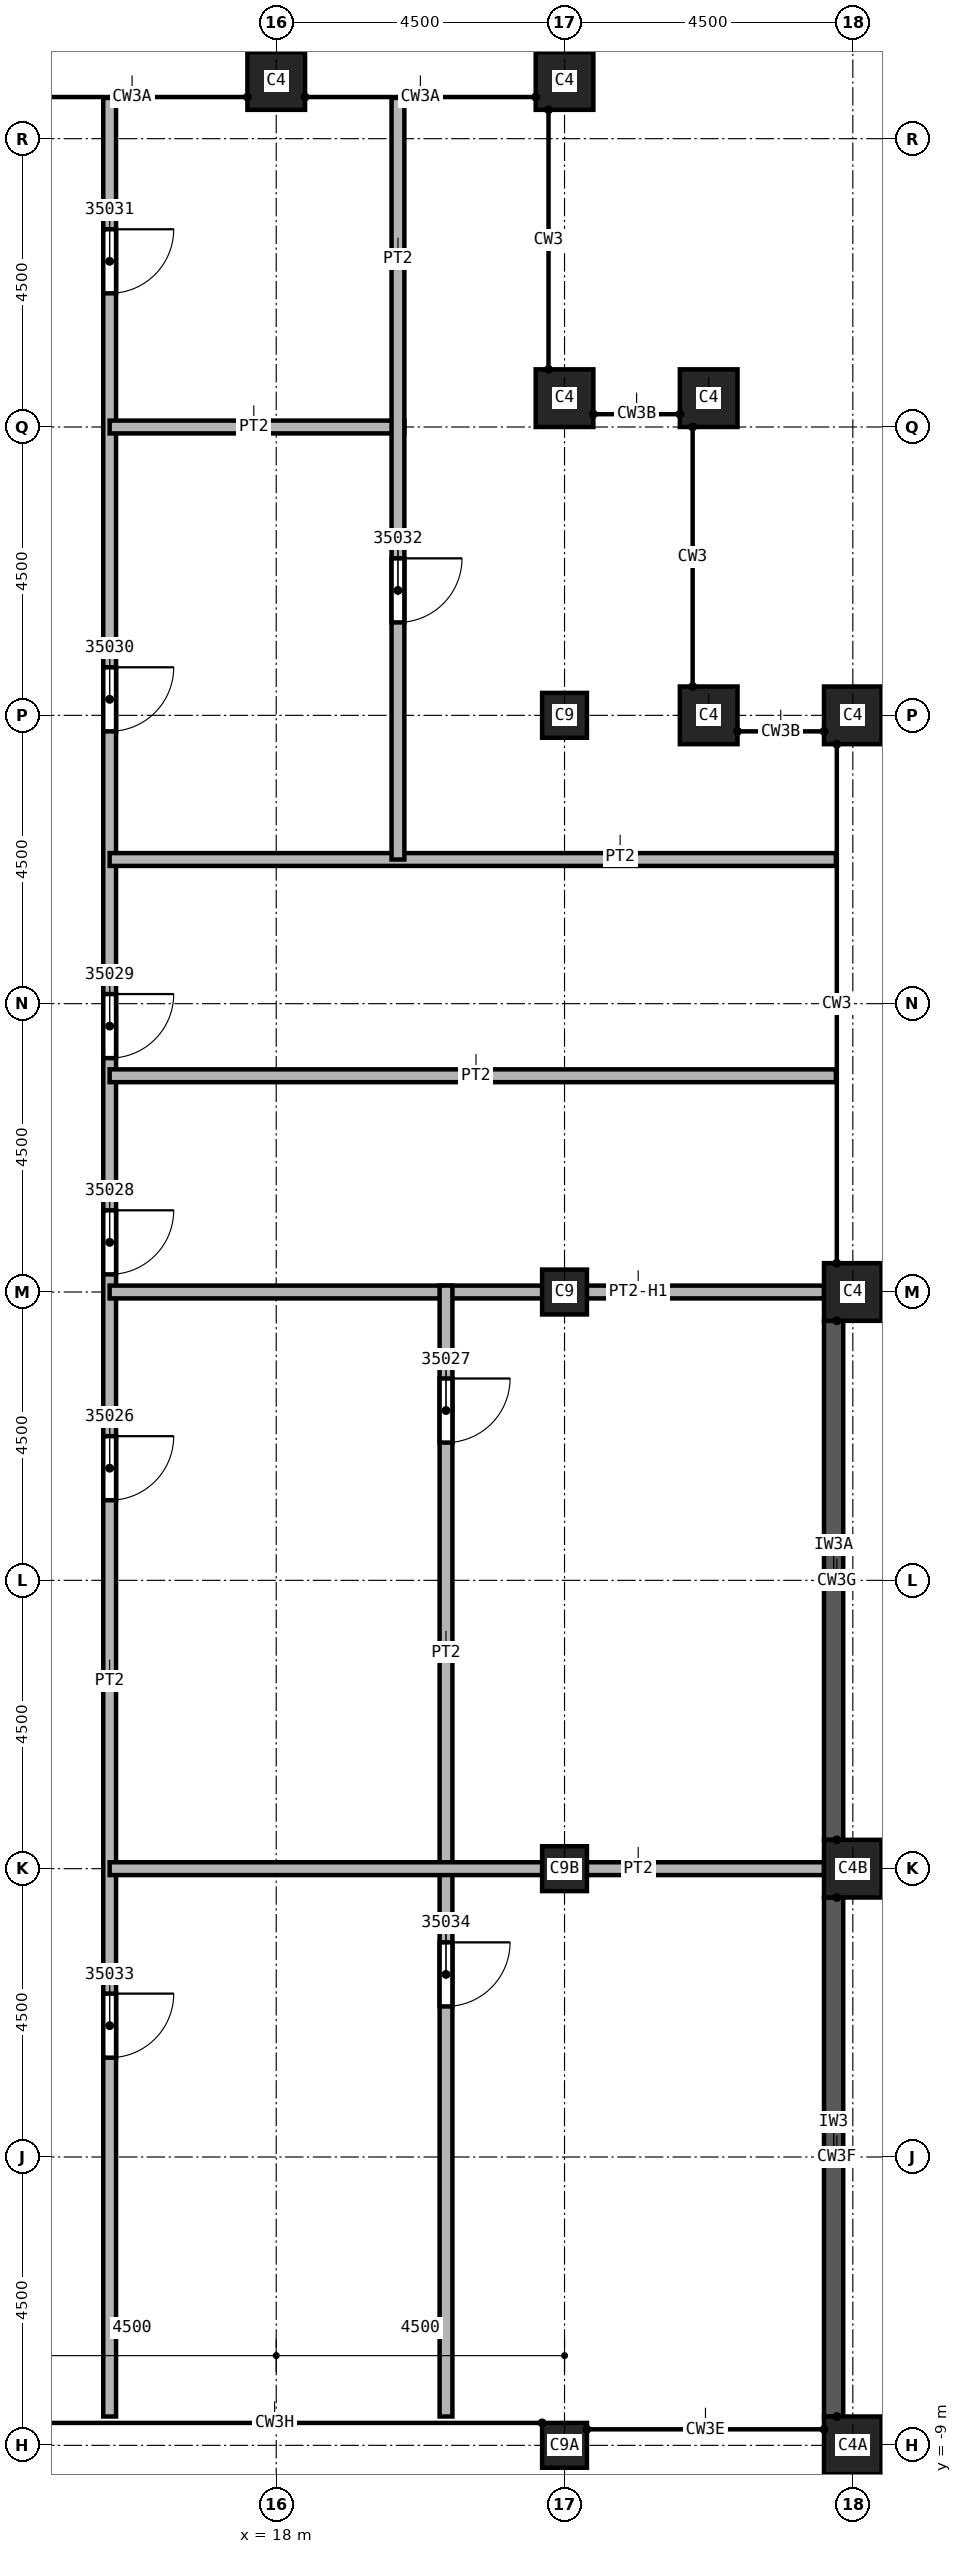
"""IFC4 building model, lengths in metres.
Left out: names, types, materials, properties, quantities, classifications, styles, units other than length and angle.
Written with IfcOpenShell. Run it as: python <this file> out.ifc"""

import sys

from ifc_helpers import new_model, si_unit, direction, frame, frame_2d, origin, origin_2d, place, context, subcontext, project, spatial, polyline, rectangle, outline, extrude, element, fill, save


model = new_model("IFC4")
c1 = context("Model", 3, precision=1e-05, world=origin(), true_north=direction((0.0, 1.0)))
c2 = subcontext(c1, "Body", "Model", "MODEL_VIEW")
j1 = project(units=[si_unit("LENGTHUNIT", "METRE"), si_unit("PLANEANGLEUNIT", "RADIAN")], contexts=[c1])
p1 = place(None, origin())
s1 = spatial("IfcSite", under=j1, at=p1, CompositionType="ELEMENT")
p2 = place(p1, origin())
s2 = spatial("IfcBuilding", under=s1, at=p2, CompositionType="ELEMENT")
p3 = place(p2, frame((0.0, 0.0, 376.0)))
s3 = spatial("IfcBuildingStorey", under=s2, at=p3, CompositionType="ELEMENT", Elevation=376.0)
p4 = place(p3, frame((22.5, 0.0, 0.0), z_axis=(0.0, 0.0, 1.0), x_axis=(1.0, 0.0, 0.0)))
e1 = element("IfcColumn", 1, at=p4, inside=s3, PredefinedType="COLUMN", context=c2, shape_type="SweptSolid", body=[
    extrude(rectangle(XDim=0.7, YDim=0.7, at=origin_2d()), origin(), (0.0, 0.0, 1.0), 7.919),
])
for number, where, z_axis, x_axis in (
    (2, (22.5, 9.0, 0.0), (0.0, 0.0, 1.0), (1.0, 0.0, 0.0)),
    (3, (22.5, 18.0, 0.0), (0.0, 0.0, 1.0), (1.0, 0.0, 0.0)),
):
    element("IfcColumn", number, at=place(p3, frame(where, z_axis=z_axis, x_axis=x_axis)), inside=s3, PredefinedType="COLUMN", context=c2, shape_type="SweptSolid", body=[
        extrude(rectangle(XDim=0.7, YDim=0.7, at=origin_2d()), origin(), (0.0, 0.0, 1.0), 4.6),
    ])
p5 = place(p3, frame((22.5, -9.0, 0.0), z_axis=(0.0, 0.0, 1.0), x_axis=(1.0, 0.0, 0.0)))
e4 = element("IfcColumn", 4, at=p5, inside=s3, PredefinedType="COLUMN", context=c2, shape_type="SweptSolid", body=[
    extrude(rectangle(XDim=0.7, YDim=0.7, at=origin_2d()), origin(), (0.0, 0.0, 1.0), 3.725),
])
p6 = place(p3, frame((27.0, 0.0, 0.0), z_axis=(0.0, 0.0, 1.0), x_axis=(0.0, 1.0, 0.0)))
e5 = element("IfcColumn", 5, at=p6, inside=s3, PredefinedType="COLUMN", context=c2, shape_type="SweptSolid", body=[
    extrude(rectangle(XDim=0.9, YDim=0.9, at=origin_2d()), origin(), (0.0, 0.0, 1.0), 7.919),
])
for number, where, z_axis, x_axis in (
    (6, (27.0, 9.0, 0.0), (0.0, 0.0, 1.0), (0.0, 1.0, 0.0)),
    (7, (27.0, 18.0, 0.0), (0.0, 0.0, 1.0), (0.0, 1.0, 0.0)),
):
    element("IfcColumn", number, at=place(p3, frame(where, z_axis=z_axis, x_axis=x_axis)), inside=s3, PredefinedType="COLUMN", context=c2, shape_type="SweptSolid", body=[
        extrude(rectangle(XDim=0.9, YDim=0.9, at=origin_2d()), origin(), (0.0, 0.0, 1.0), 4.6),
    ])
p7 = place(p3, frame((27.0, -9.0, 0.0), z_axis=(0.0, 0.0, 1.0), x_axis=(0.0, 1.0, 0.0)))
e8 = element("IfcColumn", 8, at=p7, inside=s3, PredefinedType="COLUMN", context=c2, shape_type="SweptSolid", body=[
    extrude(rectangle(XDim=0.9, YDim=0.9, at=origin_2d()), origin(), (0.0, 0.0, 1.0), 3.725),
])
for number, where, z_axis, x_axis in (
    (9, (18.0, 27.9, 0.0), (0.0, 0.0, 1.0), (1.0, 0.0, 0.0)),
    (10, (22.5, 27.9, 0.0), (0.0, 0.0, 1.0), (1.0, 0.0, 0.0)),
    (11, (22.5, 22.95, 0.0), (0.0, 0.0, 1.0), (1.0, 0.0, 0.0)),
    (12, (24.75, 22.95, 0.0), (0.0, 0.0, 1.0), (1.0, 0.0, 0.0)),
    (13, (24.75, 18.0, 0.0), (0.0, 0.0, 1.0), (1.0, 0.0, 0.0)),
):
    element("IfcColumn", number, at=place(p3, frame(where, z_axis=z_axis, x_axis=x_axis)), inside=s3, PredefinedType="COLUMN", context=c2, shape_type="SweptSolid", body=[
        extrude(rectangle(XDim=0.9, YDim=0.9, at=origin_2d()), origin(), (0.0, 0.0, 1.0), 4.6),
    ])
p8 = place(p3, frame((26.7, -8.55, 4.439), z_axis=(0.0, 0.0, 1.0), x_axis=(0.0, 1.0, 0.0)))
e14 = element("IfcWall", 14, at=p8, inside=s3, PredefinedType="SOLIDWALL", context=c2, shape_type="SweptSolid", body=[
    extrude(outline(polyline([(0.0, 0.0), (8.1, 0.0), (8.1, 3.728), (0.0, 0.05), (0.0, 0.0)])), frame((0.0, 0.15, 0.0), z_axis=(0.0, -1.0, 0.0), x_axis=(1.0, 0.0, 0.0)), (0.0, 0.0, 1.0), 0.3),
])
p9 = place(p3, frame((26.7, 0.45, 8.633), z_axis=(0.0, 0.0, 1.0), x_axis=(0.0, 1.0, 0.0)))
e15 = element("IfcWall", 15, at=p9, inside=s3, PredefinedType="SOLIDWALL", context=c2, shape_type="SweptSolid", body=[
    extrude(outline(polyline([(0.0, 0.0), (8.1, 0.0), (8.1, 3.728), (0.0, 0.05), (0.0, 0.0)])), frame((0.0, 0.15, 0.0), z_axis=(0.0, -1.0, 0.0), x_axis=(1.0, 0.0, 0.0)), (0.0, 0.0, 1.0), 0.3),
])
p10 = place(p3, frame((15.4, 27.636, 0.0), z_axis=(0.0, 0.0, 1.0), x_axis=(0.0, -1.0, 0.0)))
e16 = element("IfcWall", 16, at=p10, inside=s3, PredefinedType="PARTITIONING", context=c2, shape_type="SweptSolid", body=[
    extrude(rectangle(XDim=36.186, YDim=0.2, at=frame_2d((18.093, 0.0))), origin(), (0.0, 0.0, 1.0), 4.15),
])
p11 = place(p10, frame((20.886, 0.0, 0.0)))
e17 = element("IfcOpeningElement", 17, at=p11, cuts=e16, PredefinedType="OPENING", context=c2, shape_type="SweptSolid", body=[
    extrude(rectangle(XDim=1.0, YDim=2.1, at=frame_2d((0.5, 1.05))), frame((0.0, 0.1, 0.0), z_axis=(0.0, -1.0, 0.0), x_axis=(1.0, 0.0, 0.0)), (0.0, 0.0, 1.0), 0.2),
])
p12 = place(p10, frame((17.361, 0.0, 0.0)))
e18 = element("IfcOpeningElement", 18, at=p12, cuts=e16, PredefinedType="OPENING", context=c2, shape_type="SweptSolid", body=[
    extrude(rectangle(XDim=1.0, YDim=2.1, at=frame_2d((0.5, 1.05))), frame((0.0, 0.1, 0.0), z_axis=(0.0, -1.0, 0.0), x_axis=(1.0, 0.0, 0.0)), (0.0, 0.0, 1.0), 0.2),
])
p13 = place(p10, frame((13.986, 0.0, 0.0)))
e19 = element("IfcOpeningElement", 19, at=p13, cuts=e16, PredefinedType="OPENING", context=c2, shape_type="SweptSolid", body=[
    extrude(rectangle(XDim=1.0, YDim=2.1, at=frame_2d((0.5, 1.05))), frame((0.0, 0.1, 0.0), z_axis=(0.0, -1.0, 0.0), x_axis=(1.0, 0.0, 0.0)), (0.0, 0.0, 1.0), 0.2),
])
p14 = place(p10, frame((8.886, 0.0, 0.0)))
e20 = element("IfcOpeningElement", 20, at=p14, cuts=e16, PredefinedType="OPENING", context=c2, shape_type="SweptSolid", body=[
    extrude(rectangle(XDim=1.0, YDim=2.1, at=frame_2d((0.5, 1.05))), frame((0.0, 0.1, 0.0), z_axis=(0.0, -1.0, 0.0), x_axis=(1.0, 0.0, 0.0)), (0.0, 0.0, 1.0), 0.2),
])
p15 = place(p10, frame((2.05, 0.0, 0.0)))
e21 = element("IfcOpeningElement", 21, at=p15, cuts=e16, PredefinedType="OPENING", context=c2, shape_type="SweptSolid", body=[
    extrude(rectangle(XDim=1.0, YDim=2.1, at=frame_2d((0.5, 1.05))), frame((0.0, 0.1, 0.0), z_axis=(0.0, -1.0, 0.0), x_axis=(1.0, 0.0, 0.0)), (0.0, 0.0, 1.0), 0.2),
])
p16 = place(p10, frame((29.586, 0.0, 0.0)))
e22 = element("IfcOpeningElement", 22, at=p16, cuts=e16, PredefinedType="OPENING", context=c2, shape_type="SweptSolid", body=[
    extrude(rectangle(XDim=1.0, YDim=2.1, at=frame_2d((0.5, 1.05))), frame((0.0, 0.1, 0.0), z_axis=(0.0, -1.0, 0.0), x_axis=(1.0, 0.0, 0.0)), (0.0, 0.0, 1.0), 0.2),
])
p17 = place(p3, frame((15.4, 9.0, 0.0), z_axis=(0.0, 0.0, 1.0), x_axis=(1.0, 0.0, 0.0)))
e23 = element("IfcWall", 23, at=p17, inside=s3, PredefinedType="PARTITIONING", context=c2, shape_type="SweptSolid", body=[
    extrude(rectangle(XDim=11.15, YDim=0.2, at=frame_2d((5.575, 0.0))), origin(), (0.0, 0.0, 1.0), 3.754),
])
for number, where, z_axis, x_axis in (
    (24, (15.4, 12.375, 0.0), (0.0, 0.0, 1.0), (1.0, 0.0, 0.0)),
    (25, (15.4, 15.75, 0.0), (0.0, 0.0, 1.0), (1.0, 0.0, 0.0)),
):
    element("IfcWall", number, at=place(p3, frame(where, z_axis=z_axis, x_axis=x_axis)), inside=s3, PredefinedType="PARTITIONING", context=c2, shape_type="SweptSolid", body=[
        extrude(rectangle(XDim=11.336, YDim=0.2, at=frame_2d((5.668, 0.0))), origin(), (0.0, 0.0, 1.0), 4.15),
    ])
p18 = place(p3, frame((15.4, 22.5, 0.0), z_axis=(0.0, 0.0, 1.0), x_axis=(1.0, 0.0, 0.0)))
e26 = element("IfcWall", 26, at=p18, inside=s3, PredefinedType="PARTITIONING", context=c2, shape_type="SweptSolid", body=[
    extrude(rectangle(XDim=4.6, YDim=0.2, at=frame_2d((2.3, 0.0))), origin(), (0.0, 0.0, 1.0), 4.15),
])
p19 = place(p3, frame((19.9, 27.636, 0.0), z_axis=(0.0, 0.0, 1.0), x_axis=(0.0, -1.0, 0.0)))
e27 = element("IfcWall", 27, at=p19, inside=s3, PredefinedType="PARTITIONING", context=c2, shape_type="SweptSolid", body=[
    extrude(rectangle(XDim=11.886, YDim=0.2, at=frame_2d((5.943, 0.0))), origin(), (0.0, 0.0, 1.0), 4.15),
])
p20 = place(p19, frame((7.186, 0.0, 0.0)))
e28 = element("IfcOpeningElement", 28, at=p20, cuts=e27, PredefinedType="OPENING", context=c2, shape_type="SweptSolid", body=[
    extrude(rectangle(XDim=1.0, YDim=2.1, at=frame_2d((0.5, 1.05))), frame((0.0, 0.1, 0.0), z_axis=(0.0, -1.0, 0.0), x_axis=(1.0, 0.0, 0.0)), (0.0, 0.0, 1.0), 0.2),
])
p21 = place(p3, frame((20.65, 9.1, 0.0), z_axis=(0.0, 0.0, 1.0), x_axis=(0.0, -1.0, 0.0)))
e29 = element("IfcWall", 29, at=p21, inside=s3, PredefinedType="PARTITIONING", context=c2, shape_type="SweptSolid", body=[
    extrude(rectangle(XDim=17.65, YDim=0.2, at=frame_2d((8.825, 0.0))), origin(), (0.0, 0.0, 1.0), 4.15),
])
p22 = place(p21, frame((1.45, 0.0, 0.0)))
e30 = element("IfcOpeningElement", 30, at=p22, cuts=e29, PredefinedType="OPENING", context=c2, shape_type="SweptSolid", body=[
    extrude(rectangle(XDim=1.0, YDim=2.1, at=frame_2d((0.5, 1.05))), frame((0.0, 0.1, 0.0), z_axis=(0.0, -1.0, 0.0), x_axis=(1.0, 0.0, 0.0)), (0.0, 0.0, 1.0), 0.2),
])
p23 = place(p21, frame((10.25, 0.0, 0.0)))
e31 = element("IfcOpeningElement", 31, at=p23, cuts=e29, PredefinedType="OPENING", context=c2, shape_type="SweptSolid", body=[
    extrude(rectangle(XDim=1.0, YDim=2.1, at=frame_2d((0.5, 1.05))), frame((0.0, 0.1, 0.0), z_axis=(0.0, -1.0, 0.0), x_axis=(1.0, 0.0, 0.0)), (0.0, 0.0, 1.0), 0.2),
])
p24 = place(p3, frame((26.55, 0.0, 0.0), z_axis=(0.0, 0.0, 1.0), x_axis=(-1.0, 0.0, 0.0)))
e32 = element("IfcWall", 32, at=p24, inside=s3, PredefinedType="PARTITIONING", context=c2, shape_type="SweptSolid", body=[
    extrude(rectangle(XDim=11.15, YDim=0.2, at=frame_2d((5.575, 0.0))), origin(), (0.0, 0.0, 1.0), 4.15),
])
p25 = place(p11, origin())
e33 = element("IfcDoor", 33, at=p25, inside=s3, OperationType="SINGLE_SWING_LEFT", PredefinedType="DOOR", context=c2, shape_type="SweptSolid", body=[
    extrude(rectangle(XDim=1.0, YDim=2.1, at=frame_2d((0.5, 1.05))), frame((0.0, 0.025, 0.0), z_axis=(0.0, -1.0, 0.0), x_axis=(1.0, 0.0, 0.0)), (0.0, 0.0, 1.0), 0.05),
])
fill(e17, e33)
p26 = place(p22, origin())
e34 = element("IfcDoor", 34, at=p26, inside=s3, OperationType="SINGLE_SWING_RIGHT", PredefinedType="DOOR", context=c2, shape_type="SweptSolid", body=[
    extrude(rectangle(XDim=1.0, YDim=2.1, at=frame_2d((0.5, 1.05))), frame((0.0, 0.025, 0.0), z_axis=(0.0, -1.0, 0.0), x_axis=(1.0, 0.0, 0.0)), (0.0, 0.0, 1.0), 0.05),
])
fill(e30, e34)
p27 = place(p12, origin())
e35 = element("IfcDoor", 35, at=p27, inside=s3, OperationType="SINGLE_SWING_LEFT", PredefinedType="DOOR", context=c2, shape_type="SweptSolid", body=[
    extrude(rectangle(XDim=1.0, YDim=2.1, at=frame_2d((0.5, 1.05))), frame((0.0, 0.025, 0.0), z_axis=(0.0, -1.0, 0.0), x_axis=(1.0, 0.0, 0.0)), (0.0, 0.0, 1.0), 0.05),
])
fill(e18, e35)
p28 = place(p13, origin())
e36 = element("IfcDoor", 36, at=p28, inside=s3, OperationType="SINGLE_SWING_RIGHT", PredefinedType="DOOR", context=c2, shape_type="SweptSolid", body=[
    extrude(rectangle(XDim=1.0, YDim=2.1, at=frame_2d((0.5, 1.05))), frame((0.0, 0.025, 0.0), z_axis=(0.0, -1.0, 0.0), x_axis=(1.0, 0.0, 0.0)), (0.0, 0.0, 1.0), 0.05),
])
fill(e19, e36)
p29 = place(p14, origin())
e37 = element("IfcDoor", 37, at=p29, inside=s3, OperationType="SINGLE_SWING_LEFT", PredefinedType="DOOR", context=c2, shape_type="SweptSolid", body=[
    extrude(rectangle(XDim=1.0, YDim=2.1, at=frame_2d((0.5, 1.05))), frame((0.0, 0.025, 0.0), z_axis=(0.0, -1.0, 0.0), x_axis=(1.0, 0.0, 0.0)), (0.0, 0.0, 1.0), 0.05),
])
fill(e20, e37)
p30 = place(p15, origin())
e38 = element("IfcDoor", 38, at=p30, inside=s3, OperationType="SINGLE_SWING_RIGHT", PredefinedType="DOOR", context=c2, shape_type="SweptSolid", body=[
    extrude(rectangle(XDim=1.0, YDim=2.1, at=frame_2d((0.5, 1.05))), frame((0.0, 0.025, 0.0), z_axis=(0.0, -1.0, 0.0), x_axis=(1.0, 0.0, 0.0)), (0.0, 0.0, 1.0), 0.05),
])
fill(e21, e38)
p31 = place(p20, origin())
e39 = element("IfcDoor", 39, at=p31, inside=s3, OperationType="SINGLE_SWING_LEFT", PredefinedType="DOOR", context=c2, shape_type="SweptSolid", body=[
    extrude(rectangle(XDim=1.0, YDim=2.1, at=frame_2d((0.5, 1.05))), frame((0.0, 0.025, 0.0), z_axis=(0.0, -1.0, 0.0), x_axis=(1.0, 0.0, 0.0)), (0.0, 0.0, 1.0), 0.05),
])
fill(e28, e39)
p32 = place(p16, origin())
e40 = element("IfcDoor", 40, at=p32, inside=s3, OperationType="SINGLE_SWING_RIGHT", PredefinedType="DOOR", context=c2, shape_type="SweptSolid", body=[
    extrude(rectangle(XDim=1.0, YDim=2.1, at=frame_2d((0.5, 1.05))), frame((0.0, 0.025, 0.0), z_axis=(0.0, -1.0, 0.0), x_axis=(1.0, 0.0, 0.0)), (0.0, 0.0, 1.0), 0.05),
])
fill(e22, e40)
p33 = place(p23, origin())
e41 = element("IfcDoor", 41, at=p33, inside=s3, OperationType="SINGLE_SWING_LEFT", PredefinedType="DOOR", context=c2, shape_type="SweptSolid", body=[
    extrude(rectangle(XDim=1.0, YDim=2.1, at=frame_2d((0.5, 1.05))), frame((0.0, 0.025, 0.0), z_axis=(0.0, -1.0, 0.0), x_axis=(1.0, 0.0, 0.0)), (0.0, 0.0, 1.0), 0.05),
])
fill(e31, e41)
save(model, sys.argv[1])
